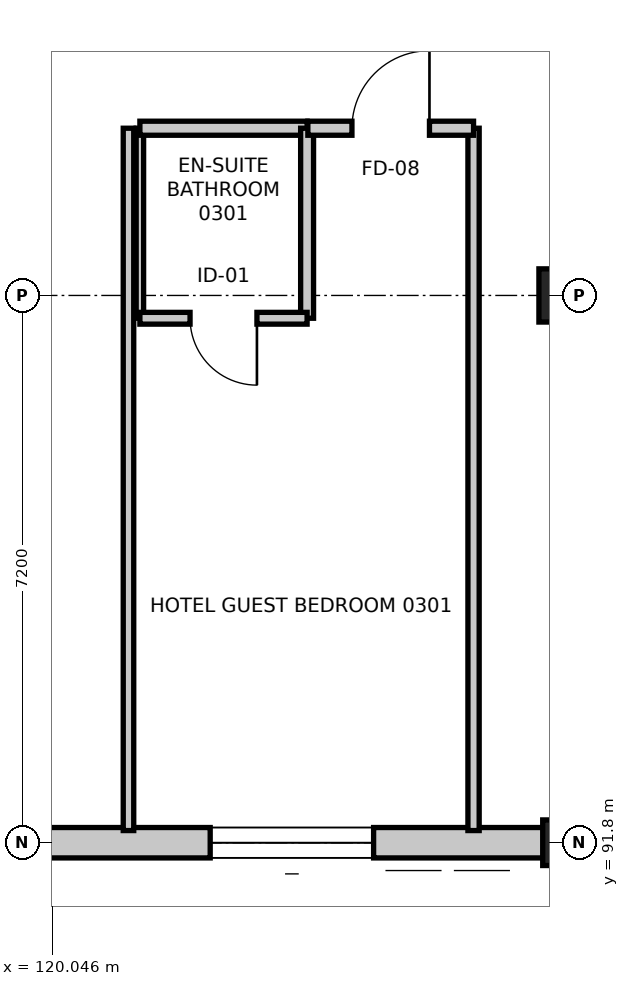
"""IFC4 building model, lengths in metres.
Left out: names, types, materials, properties, quantities, classifications, styles, units other than length and angle.
Written with IfcOpenShell. Run it as: python <this file> out.ifc"""

import sys

from ifc_helpers import new_model, si_unit, direction, frame, frame_2d, origin, origin_2d, place, context, subcontext, project, spatial, rectangle, extrude, element, fill, save


model = new_model("IFC4")
c1 = context("Model", 3, precision=1e-05, world=origin(), true_north=direction((0.0, 1.0)))
c2 = subcontext(c1, "Body", "Model", "MODEL_VIEW")
j1 = project(units=[si_unit("LENGTHUNIT", "METRE"), si_unit("PLANEANGLEUNIT", "RADIAN")], contexts=[c1])
p1 = place(None, origin())
s1 = spatial("IfcSite", under=j1, at=p1, CompositionType="ELEMENT")
p2 = place(p1, origin())
s2 = spatial("IfcBuilding", under=s1, at=p2, CompositionType="ELEMENT")
p3 = place(p2, frame((0.0, 0.0, 15.0)))
s3 = spatial("IfcBuildingStorey", under=s2, at=p3, CompositionType="ELEMENT", Elevation=15.0)
p4 = place(p3, frame((126.8, 91.8, 0.0), z_axis=(0.0, 0.0, 1.0), x_axis=(1.0, 0.0, 0.0)))
e1 = element("IfcColumn", 1, at=p4, inside=s3, PredefinedType="COLUMN", context=c2, shape_type="SweptSolid", body=[
    extrude(rectangle(XDim=0.6, YDim=0.6, at=origin_2d()), origin(), (0.0, 0.0, 1.0), 4.2),
])
p5 = place(p3, frame((126.8, 99.0, 0.0), z_axis=(0.0, 0.0, 1.0), x_axis=(1.0, 0.0, 0.0)))
e2 = element("IfcColumn", 2, at=p5, inside=s3, PredefinedType="COLUMN", context=c2, shape_type="SweptSolid", body=[
    extrude(rectangle(XDim=0.7, YDim=0.7, at=origin_2d()), origin(), (0.0, 0.0, 1.0), 4.2),
])
p6 = place(p3, frame((126.8, 91.8, 0.0), z_axis=(0.0, 0.0, 1.0), x_axis=(-1.0, 0.0, 0.0)))
e3 = element("IfcWall", 3, at=p6, inside=s3, PredefinedType="STANDARD", context=c2, shape_type="SweptSolid", body=[
    extrude(rectangle(XDim=7.2, YDim=0.4, at=frame_2d((3.6, 0.0))), origin(), (0.0, 0.0, 1.0), 3.325),
])
p7 = place(p6, frame((2.525, 0.0, 0.9)))
e4 = element("IfcOpeningElement", 4, at=p7, cuts=e3, PredefinedType="OPENING", context=c2, shape_type="SweptSolid", body=[
    extrude(rectangle(XDim=2.15, YDim=2.2, at=frame_2d((1.075, 1.1))), frame((0.0, 0.21, 0.0), z_axis=(0.0, -1.0, 0.0), x_axis=(1.0, 0.0, 0.0)), (0.0, 0.0, 1.0), 0.42),
])
p8 = place(p3, frame((121.2, 98.7, 0.0), z_axis=(0.0, 0.0, 1.0), x_axis=(0.0, 1.0, 0.0)))
e5 = element("IfcWall", 5, at=p8, inside=s3, PredefinedType="PARTITIONING", context=c2, shape_type="SweptSolid", body=[
    extrude(rectangle(XDim=2.5, YDim=0.098, at=frame_2d((1.25, 0.0))), origin(), (0.0, 0.0, 1.0), 3.325),
])
p9 = place(p3, frame((121.2, 101.2, 0.0), z_axis=(0.0, 0.0, 1.0), x_axis=(1.0, 0.0, 0.0)))
e6 = element("IfcWall", 6, at=p9, inside=s3, PredefinedType="PARTITIONING", context=c2, shape_type="SweptSolid", body=[
    extrude(rectangle(XDim=2.2, YDim=0.185, at=frame_2d((1.1, 0.0))), origin(), (0.0, 0.0, 1.0), 3.94),
])
p10 = place(p3, frame((123.4, 101.2, 0.0), z_axis=(0.0, 0.0, 1.0), x_axis=(0.0, -1.0, 0.0)))
e7 = element("IfcWall", 7, at=p10, inside=s3, PredefinedType="PARTITIONING", context=c2, shape_type="SweptSolid", body=[
    extrude(rectangle(XDim=2.5, YDim=0.17, at=frame_2d((1.25, 0.0))), origin(), (0.0, 0.0, 1.0), 3.325),
])
p11 = place(p3, frame((123.4, 98.7, 0.0), z_axis=(0.0, 0.0, 1.0), x_axis=(-1.0, 0.0, 0.0)))
e8 = element("IfcWall", 8, at=p11, inside=s3, PredefinedType="PARTITIONING", context=c2, shape_type="SweptSolid", body=[
    extrude(rectangle(XDim=2.2, YDim=0.155, at=frame_2d((1.1, 0.0))), origin(), (0.0, 0.0, 1.0), 3.94),
])
p12 = place(p11, frame((0.66, 0.0, 0.0)))
e9 = element("IfcOpeningElement", 9, at=p12, cuts=e8, PredefinedType="OPENING", context=c2, shape_type="SweptSolid", body=[
    extrude(rectangle(XDim=0.88, YDim=2.06, at=frame_2d((0.44, 1.03))), frame((0.0, 0.087, 0.0), z_axis=(0.0, -1.0, 0.0), x_axis=(1.0, 0.0, 0.0)), (0.0, 0.0, 1.0), 0.175),
])
p13 = place(p3, frame((125.59, 101.2, 0.0), z_axis=(0.0, 0.0, 1.0), x_axis=(0.0, -1.0, 0.0)))
e10 = element("IfcWall", 10, at=p13, inside=s3, PredefinedType="PARTITIONING", context=c2, shape_type="SweptSolid", body=[
    extrude(rectangle(XDim=9.24, YDim=0.148, at=frame_2d((4.62, 0.0))), origin(), (0.0, 0.0, 1.0), 3.325),
])
p14 = place(p3, frame((121.05, 91.96, 0.0), z_axis=(0.0, 0.0, 1.0), x_axis=(0.0, 1.0, 0.0)))
e11 = element("IfcWall", 11, at=p14, inside=s3, PredefinedType="PARTITIONING", context=c2, shape_type="SweptSolid", body=[
    extrude(rectangle(XDim=9.24, YDim=0.138, at=frame_2d((4.62, 0.0))), origin(), (0.0, 0.0, 1.0), 3.325),
])
p15 = place(p3, frame((123.41, 101.2, 0.0), z_axis=(0.0, 0.0, 1.0), x_axis=(1.0, 0.0, 0.0)))
e12 = element("IfcWall", 12, at=p15, inside=s3, PredefinedType="PARTITIONING", context=c2, shape_type="SweptSolid", body=[
    extrude(rectangle(XDim=2.18, YDim=0.185, at=frame_2d((1.09, 0.0))), origin(), (0.0, 0.0, 1.0), 3.94),
])
p16 = place(p15, frame((0.58, 0.0, 0.0)))
e13 = element("IfcOpeningElement", 13, at=p16, cuts=e12, PredefinedType="OPENING", context=c2, shape_type="SweptSolid", body=[
    extrude(rectangle(XDim=1.02, YDim=2.15, at=frame_2d((0.51, 1.075))), frame((0.0, 0.103, 0.0), z_axis=(0.0, -1.0, 0.0), x_axis=(1.0, 0.0, 0.0)), (0.0, 0.0, 1.0), 0.205),
])
p17 = place(p7, origin())
e14 = element("IfcWindow", 14, at=p17, inside=s3, PartitioningType="SINGLE_PANEL", PredefinedType="WINDOW", context=c2, shape_type="SweptSolid", body=[
    extrude(rectangle(XDim=2.15, YDim=2.2, at=frame_2d((1.075, 1.1))), frame((0.0, 0.03, 0.0), z_axis=(0.0, -1.0, 0.0), x_axis=(1.0, 0.0, 0.0)), (0.0, 0.0, 1.0), 0.06),
])
fill(e4, e14)
p18 = place(p12, origin())
e15 = element("IfcDoor", 15, at=p18, inside=s3, OperationType="SINGLE_SWING_LEFT", PredefinedType="DOOR", context=c2, shape_type="SweptSolid", body=[
    extrude(rectangle(XDim=0.88, YDim=2.06, at=frame_2d((0.44, 1.03))), frame((0.0, 0.025, 0.0), z_axis=(0.0, -1.0, 0.0), x_axis=(1.0, 0.0, 0.0)), (0.0, 0.0, 1.0), 0.05),
])
fill(e9, e15)
p19 = place(p16, origin())
e16 = element("IfcDoor", 16, at=p19, inside=s3, OperationType="SINGLE_SWING_RIGHT", PredefinedType="DOOR", context=c2, shape_type="SweptSolid", body=[
    extrude(rectangle(XDim=1.02, YDim=2.15, at=frame_2d((0.51, 1.075))), frame((0.0, 0.025, 0.0), z_axis=(0.0, -1.0, 0.0), x_axis=(1.0, 0.0, 0.0)), (0.0, 0.0, 1.0), 0.05),
])
fill(e13, e16)
save(model, sys.argv[1])
